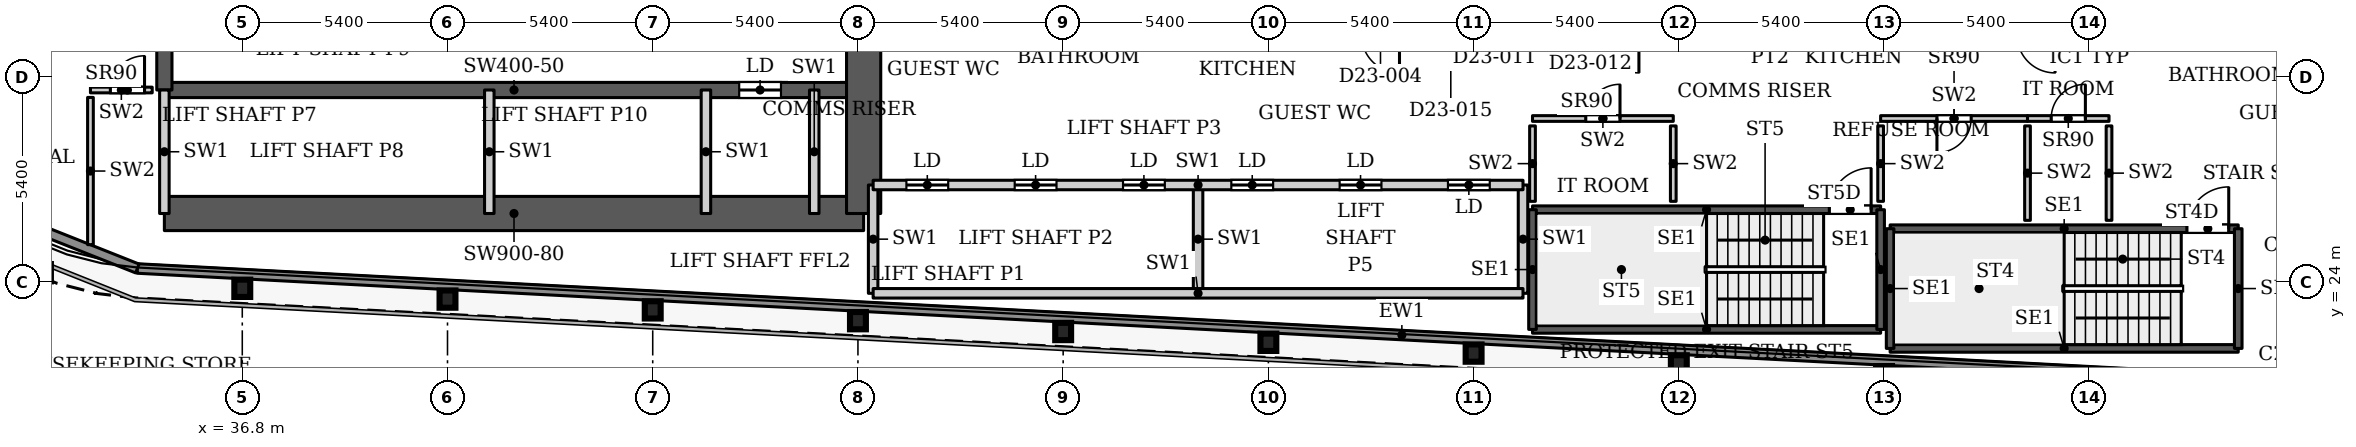
"""IFC4 building model, lengths in metres.
Left out: names, types, materials, properties, quantities, classifications, styles, units other than length and angle.
Written with IfcOpenShell. Run it as: python <this file> out.ifc"""

import sys

from ifc_helpers import new_model, si_unit, direction, frame, frame_2d, origin, origin_2d, place, context, subcontext, project, spatial, rectangle, i_section, extrude, source, transform, mapped, element, fill, save


model = new_model("IFC4")
c1 = context("Model", 3, precision=1e-05, world=origin(), true_north=direction((0.0, 1.0)))
c2 = subcontext(c1, "Body", "Model", "MODEL_VIEW")
j1 = project(units=[si_unit("LENGTHUNIT", "METRE"), si_unit("PLANEANGLEUNIT", "RADIAN")], contexts=[c1])
p1 = place(None, origin())
s1 = spatial("IfcSite", under=j1, at=p1, CompositionType="ELEMENT")
p2 = place(p1, origin())
s2 = spatial("IfcBuilding", under=s1, at=p2, CompositionType="ELEMENT")
p3 = place(p2, frame((0.0, 0.0, 101.9)))
s3 = spatial("IfcBuildingStorey", under=s2, at=p3, CompositionType="ELEMENT", Elevation=101.9)
for number, where, z_axis, x_axis in (
    (1, (80.0, 21.558, 0.0), (0.0, 0.0, 1.0), (1.0, 0.0, 0.0)),
    (2, (74.6, 21.843, 0.0), (0.0, 0.0, 1.0), (1.0, 0.0, 0.0)),
    (3, (69.2, 22.127, 0.0), (0.0, 0.0, 1.0), (1.0, 0.0, 0.0)),
    (4, (63.8, 22.411, 0.0), (0.0, 0.0, 1.0), (1.0, 0.0, 0.0)),
    (5, (58.4, 22.695, 0.0), (0.0, 0.0, 1.0), (1.0, 0.0, 0.0)),
    (6, (53.0, 22.98, 0.0), (0.0, 0.0, 1.0), (1.0, 0.0, 0.0)),
    (7, (47.6, 23.264, 0.0), (0.0, 0.0, 1.0), (1.0, 0.0, 0.0)),
    (8, (42.2, 23.548, 0.0), (0.0, 0.0, 1.0), (1.0, 0.0, 0.0)),
    (9, (36.8, 23.832, 0.0), (0.0, 0.0, 1.0), (1.0, 0.0, 0.0)),
):
    element("IfcColumn", number, at=place(p3, frame(where, z_axis=z_axis, x_axis=x_axis)), inside=s3, PredefinedType="COLUMN", context=c2, shape_type="SweptSolid", body=[
        extrude(i_section(OverallWidth=0.418, OverallDepth=0.455, WebThickness=0.042, FlangeThickness=0.068, FilletRadius=0.014, at=origin_2d()), origin(), (0.0, 0.0, 1.0), 3.9),
    ])
p4 = place(p3, frame((34.75, 25.8, 0.0), z_axis=(0.0, 0.0, 1.0), x_axis=(1.0, 0.0, 0.0)))
e10 = element("IfcWall", 10, at=p4, inside=s3, PredefinedType="SHEAR", context=c2, shape_type="SweptSolid", body=[
    extrude(rectangle(XDim=18.4, YDim=0.9, at=frame_2d((9.2, 0.0))), origin(), (0.0, 0.0, 1.0), 3.9),
])
p5 = place(p3, frame((34.75, 29.05, 0.0), z_axis=(0.0, 0.0, 1.0), x_axis=(1.0, 0.0, 0.0)))
e11 = element("IfcWall", 11, at=p5, inside=s3, PredefinedType="SHEAR", context=c2, shape_type="SweptSolid", body=[
    extrude(rectangle(XDim=18.4, YDim=0.4, at=frame_2d((9.2, 0.0))), origin(), (0.0, 0.0, 1.0), 3.9),
])
p6 = place(p5, frame((15.125, 0.0, 0.0)))
e12 = element("IfcOpeningElement", 12, at=p6, cuts=e11, PredefinedType="OPENING", context=c2, shape_type="SweptSolid", body=[
    extrude(rectangle(XDim=1.1, YDim=2.2, at=frame_2d((0.55, 1.1))), frame((0.0, 0.21, 0.0), z_axis=(0.0, -1.0, 0.0), x_axis=(1.0, 0.0, 0.0)), (0.0, 0.0, 1.0), 0.42),
])
p7 = place(p3, frame((34.75, 29.05, 0.0), z_axis=(0.0, 0.0, 1.0), x_axis=(0.0, 1.0, 0.0)))
e13 = element("IfcWall", 13, at=p7, inside=s3, PredefinedType="SHEAR", context=c2, shape_type="SweptSolid", body=[
    extrude(rectangle(XDim=18.45, YDim=0.4, at=frame_2d((9.225, 0.0))), origin(), (0.0, 0.0, 1.0), 3.9),
])
p8 = place(p7, frame((8.025, 0.0, 0.0)))
e14 = element("IfcOpeningElement", 14, at=p8, cuts=e13, PredefinedType="OPENING", context=c2, shape_type="SweptSolid", body=[
    extrude(rectangle(XDim=1.1, YDim=2.2, at=frame_2d((0.55, 1.1))), frame((0.0, 0.21, 0.0), z_axis=(0.0, -1.0, 0.0), x_axis=(1.0, 0.0, 0.0)), (0.0, 0.0, 1.0), 0.42),
])
p9 = place(p7, frame((10.875, 0.0, 0.0)))
e15 = element("IfcOpeningElement", 15, at=p9, cuts=e13, PredefinedType="OPENING", context=c2, shape_type="SweptSolid", body=[
    extrude(rectangle(XDim=1.1, YDim=2.2, at=frame_2d((0.55, 1.1))), frame((0.0, 0.21, 0.0), z_axis=(0.0, -1.0, 0.0), x_axis=(1.0, 0.0, 0.0)), (0.0, 0.0, 1.0), 0.42),
])
p10 = place(p7, frame((13.725, 0.0, 0.0)))
e16 = element("IfcOpeningElement", 16, at=p10, cuts=e13, PredefinedType="OPENING", context=c2, shape_type="SweptSolid", body=[
    extrude(rectangle(XDim=1.1, YDim=2.2, at=frame_2d((0.55, 1.1))), frame((0.0, 0.21, 0.0), z_axis=(0.0, -1.0, 0.0), x_axis=(1.0, 0.0, 0.0)), (0.0, 0.0, 1.0), 0.42),
])
p11 = place(p7, frame((15.95, 0.0, 0.0)))
e17 = element("IfcOpeningElement", 17, at=p11, cuts=e13, PredefinedType="OPENING", context=c2, shape_type="SweptSolid", body=[
    extrude(rectangle(XDim=1.1, YDim=2.2, at=frame_2d((0.55, 1.1))), frame((0.0, 0.21, 0.0), z_axis=(0.0, -1.0, 0.0), x_axis=(1.0, 0.0, 0.0)), (0.0, 0.0, 1.0), 0.42),
])
p12 = place(p3, frame((53.15, 25.8, 0.0), z_axis=(0.0, 0.0, 1.0), x_axis=(0.0, 1.0, 0.0)))
e18 = element("IfcWall", 18, at=p12, inside=s3, PredefinedType="SHEAR", context=c2, shape_type="SweptSolid", body=[
    extrude(rectangle(XDim=10.4, YDim=0.9, at=frame_2d((5.2, 0.0))), origin(), (0.0, 0.0, 1.0), 3.9),
])
p13 = place(p3, frame((100.586, 20.85, 0.0), z_axis=(0.0, 0.0, 1.0), x_axis=(-0.99861746497, 0.052565755559, 0.0)))
e19 = element("IfcWall", 19, at=p13, inside=s3, PredefinedType="SOLIDWALL", context=c2, shape_type="SweptSolid", body=[
    extrude(rectangle(XDim=66.639, YDim=0.25, at=frame_2d((33.319, 0.0))), origin(), (0.0, 0.0, 1.0), 3.75),
])
p14 = place(p3, frame((34.039, 24.353, 0.0), z_axis=(0.0, 0.0, 1.0), x_axis=(-0.929352825399, 0.369192803184, 0.0)))
e20 = element("IfcWall", 20, at=p14, inside=s3, PredefinedType="SOLIDWALL", context=c2, shape_type="SweptSolid", body=[
    extrude(rectangle(XDim=4.656, YDim=0.25, at=frame_2d((2.328, 0.0))), origin(), (0.0, 0.0, 1.0), 3.75),
])
p15 = place(p3, frame((80.16, 22.25, 0.0), z_axis=(0.0, 0.0, 1.0), x_axis=(1.0, 0.0, 0.0)))
e21 = element("IfcWall", 21, at=p15, inside=s3, PredefinedType="SHEAR", context=c2, shape_type="SweptSolid", body=[
    extrude(rectangle(XDim=9.16, YDim=0.2, at=frame_2d((4.58, 0.0))), origin(), (0.0, 0.0, 1.0), 3.9),
])
p16 = place(p3, frame((80.16, 25.4, 0.0), z_axis=(0.0, 0.0, 1.0), x_axis=(1.0, 0.0, 0.0)))
e22 = element("IfcWall", 22, at=p16, inside=s3, PredefinedType="SHEAR", context=c2, shape_type="SweptSolid", body=[
    extrude(rectangle(XDim=9.16, YDim=0.2, at=frame_2d((4.58, 0.0))), origin(), (0.0, 0.0, 1.0), 3.9),
])
p17 = place(p16, frame((7.81, 0.0, 0.0)))
e23 = element("IfcOpeningElement", 23, at=p17, cuts=e22, PredefinedType="OPENING", context=c2, shape_type="SweptSolid", body=[
    extrude(rectangle(XDim=1.1, YDim=2.2, at=frame_2d((0.55, 1.1))), frame((0.0, 0.11, 0.0), z_axis=(0.0, -1.0, 0.0), x_axis=(1.0, 0.0, 0.0)), (0.0, 0.0, 1.0), 0.22),
])
for number, where, z_axis, x_axis in (
    (24, (80.16, 22.25, 0.0), (0.0, 0.0, 1.0), (0.0, 1.0, 0.0)),
    (25, (89.32, 22.25, 0.0), (0.0, 0.0, 1.0), (0.0, 1.0, 0.0)),
):
    element("IfcWall", number, at=place(p3, frame(where, z_axis=z_axis, x_axis=x_axis)), inside=s3, PredefinedType="SHEAR", context=c2, shape_type="SweptSolid", body=[
        extrude(rectangle(XDim=3.15, YDim=0.2, at=frame_2d((1.575, 0.0))), origin(), (0.0, 0.0, 1.0), 3.9),
    ])
p18 = place(p3, frame((70.75, 22.75, 0.0), z_axis=(0.0, 0.0, 1.0), x_axis=(1.0, 0.0, 0.0)))
e26 = element("IfcWall", 26, at=p18, inside=s3, PredefinedType="SHEAR", context=c2, shape_type="SweptSolid", body=[
    extrude(rectangle(XDim=9.16, YDim=0.2, at=frame_2d((4.58, 0.0))), origin(), (0.0, 0.0, 1.0), 3.9),
])
p19 = place(p3, frame((70.75, 25.9, 0.0), z_axis=(0.0, 0.0, 1.0), x_axis=(1.0, 0.0, 0.0)))
e27 = element("IfcWall", 27, at=p19, inside=s3, PredefinedType="SHEAR", context=c2, shape_type="SweptSolid", body=[
    extrude(rectangle(XDim=9.16, YDim=0.2, at=frame_2d((4.58, 0.0))), origin(), (0.0, 0.0, 1.0), 3.9),
])
p20 = place(p19, frame((7.81, 0.0, 0.0)))
e28 = element("IfcOpeningElement", 28, at=p20, cuts=e27, PredefinedType="OPENING", context=c2, shape_type="SweptSolid", body=[
    extrude(rectangle(XDim=1.1, YDim=2.2, at=frame_2d((0.55, 1.1))), frame((0.0, 0.11, 0.0), z_axis=(0.0, -1.0, 0.0), x_axis=(1.0, 0.0, 0.0)), (0.0, 0.0, 1.0), 0.22),
])
for number, where, z_axis, x_axis in (
    (29, (70.75, 22.75, 0.0), (0.0, 0.0, 1.0), (0.0, 1.0, 0.0)),
    (30, (79.91, 22.75, 0.0), (0.0, 0.0, 1.0), (0.0, 1.0, 0.0)),
):
    element("IfcWall", number, at=place(p3, frame(where, z_axis=z_axis, x_axis=x_axis)), inside=s3, PredefinedType="SHEAR", context=c2, shape_type="SweptSolid", body=[
        extrude(rectangle(XDim=3.15, YDim=0.2, at=frame_2d((1.575, 0.0))), origin(), (0.0, 0.0, 1.0), 3.9),
    ])
for number, where, z_axis, x_axis in (
    (31, (34.75, 25.8, 0.0), (0.0, 0.0, 1.0), (0.0, 1.0, 0.0)),
    (32, (43.3, 25.8, 0.0), (0.0, 0.0, 1.0), (0.0, 1.0, 0.0)),
    (33, (49.0, 25.8, 0.0), (0.0, 0.0, 1.0), (0.0, 1.0, 0.0)),
    (34, (51.85, 25.8, 0.0), (0.0, 0.0, 1.0), (0.0, 1.0, 0.0)),
):
    element("IfcWall", number, at=place(p3, frame(where, z_axis=z_axis, x_axis=x_axis)), inside=s3, PredefinedType="PARTITIONING", context=c2, shape_type="SweptSolid", body=[
        extrude(rectangle(XDim=3.25, YDim=0.25, at=frame_2d((1.625, 0.0))), origin(), (0.0, 0.0, 1.0), 3.9),
    ])
for number, where, z_axis, x_axis in (
    (35, (53.4, 23.7, 0.0), (0.0, 0.0, 1.0), (0.0, 1.0, 0.0)),
    (36, (61.95, 23.7, 0.0), (0.0, 0.0, 1.0), (0.0, 1.0, 0.0)),
    (37, (70.5, 23.7, 0.0), (0.0, 0.0, 1.0), (0.0, 1.0, 0.0)),
):
    element("IfcWall", number, at=place(p3, frame(where, z_axis=z_axis, x_axis=x_axis)), inside=s3, PredefinedType="PARTITIONING", context=c2, shape_type="SweptSolid", body=[
        extrude(rectangle(XDim=2.85, YDim=0.25, at=frame_2d((1.425, 0.0))), origin(), (0.0, 0.0, 1.0), 3.9),
    ])
p21 = place(p3, frame((53.4, 23.7, 0.0), z_axis=(0.0, 0.0, 1.0), x_axis=(1.0, 0.0, 0.0)))
e38 = element("IfcWall", 38, at=p21, inside=s3, PredefinedType="PARTITIONING", context=c2, shape_type="SweptSolid", body=[
    extrude(rectangle(XDim=17.1, YDim=0.25, at=frame_2d((8.55, 0.0))), origin(), (0.0, 0.0, 1.0), 3.9),
])
p22 = place(p3, frame((53.4, 26.55, 0.0), z_axis=(0.0, 0.0, 1.0), x_axis=(1.0, 0.0, 0.0)))
e39 = element("IfcWall", 39, at=p22, inside=s3, PredefinedType="PARTITIONING", context=c2, shape_type="SweptSolid", body=[
    extrude(rectangle(XDim=17.1, YDim=0.25, at=frame_2d((8.55, 0.0))), origin(), (0.0, 0.0, 1.0), 3.9),
])
p23 = place(p22, frame((0.875, 0.0, 0.0)))
e40 = element("IfcOpeningElement", 40, at=p23, cuts=e39, PredefinedType="OPENING", context=c2, shape_type="SweptSolid", body=[
    extrude(rectangle(XDim=1.1, YDim=2.2, at=frame_2d((0.55, 1.1))), frame((0.0, 0.135, 0.0), z_axis=(0.0, -1.0, 0.0), x_axis=(1.0, 0.0, 0.0)), (0.0, 0.0, 1.0), 0.27),
])
p24 = place(p22, frame((3.725, 0.0, 0.0)))
e41 = element("IfcOpeningElement", 41, at=p24, cuts=e39, PredefinedType="OPENING", context=c2, shape_type="SweptSolid", body=[
    extrude(rectangle(XDim=1.1, YDim=2.2, at=frame_2d((0.55, 1.1))), frame((0.0, 0.135, 0.0), z_axis=(0.0, -1.0, 0.0), x_axis=(1.0, 0.0, 0.0)), (0.0, 0.0, 1.0), 0.27),
])
p25 = place(p22, frame((6.575, 0.0, 0.0)))
e42 = element("IfcOpeningElement", 42, at=p25, cuts=e39, PredefinedType="OPENING", context=c2, shape_type="SweptSolid", body=[
    extrude(rectangle(XDim=1.1, YDim=2.2, at=frame_2d((0.55, 1.1))), frame((0.0, 0.135, 0.0), z_axis=(0.0, -1.0, 0.0), x_axis=(1.0, 0.0, 0.0)), (0.0, 0.0, 1.0), 0.27),
])
p26 = place(p22, frame((9.425, 0.0, 0.0)))
e43 = element("IfcOpeningElement", 43, at=p26, cuts=e39, PredefinedType="OPENING", context=c2, shape_type="SweptSolid", body=[
    extrude(rectangle(XDim=1.1, YDim=2.2, at=frame_2d((0.55, 1.1))), frame((0.0, 0.135, 0.0), z_axis=(0.0, -1.0, 0.0), x_axis=(1.0, 0.0, 0.0)), (0.0, 0.0, 1.0), 0.27),
])
p27 = place(p22, frame((12.275, 0.0, 0.0)))
e44 = element("IfcOpeningElement", 44, at=p27, cuts=e39, PredefinedType="OPENING", context=c2, shape_type="SweptSolid", body=[
    extrude(rectangle(XDim=1.1, YDim=2.2, at=frame_2d((0.55, 1.1))), frame((0.0, 0.135, 0.0), z_axis=(0.0, -1.0, 0.0), x_axis=(1.0, 0.0, 0.0)), (0.0, 0.0, 1.0), 0.27),
])
p28 = place(p22, frame((15.125, 0.0, 0.0)))
e45 = element("IfcOpeningElement", 45, at=p28, cuts=e39, PredefinedType="OPENING", context=c2, shape_type="SweptSolid", body=[
    extrude(rectangle(XDim=1.1, YDim=2.2, at=frame_2d((0.55, 1.1))), frame((0.0, 0.135, 0.0), z_axis=(0.0, -1.0, 0.0), x_axis=(1.0, 0.0, 0.0)), (0.0, 0.0, 1.0), 0.27),
])
p29 = place(p3, frame((32.805, 29.05, 0.0), z_axis=(0.0, 0.0, 1.0), x_axis=(1.0, 0.0, 0.0)))
e46 = element("IfcWall", 46, at=p29, inside=s3, PredefinedType="PARTITIONING", context=c2, shape_type="SweptSolid", body=[
    extrude(rectangle(XDim=1.625, YDim=0.15, at=frame_2d((0.812, 0.0))), origin(), (0.0, 0.0, 1.0), 3.9),
])
p30 = place(p29, frame((0.523, 0.0, 0.0)))
e47 = element("IfcOpeningElement", 47, at=p30, cuts=e46, PredefinedType="OPENING", context=c2, shape_type="SweptSolid", body=[
    extrude(rectangle(XDim=0.9, YDim=2.2, at=frame_2d((0.45, 1.1))), frame((0.0, 0.085, 0.0), z_axis=(0.0, -1.0, 0.0), x_axis=(1.0, 0.0, 0.0)), (0.0, 0.0, 1.0), 0.17),
])
p31 = place(p3, frame((32.805, 24.98, 0.0), z_axis=(0.0, 0.0, 1.0), x_axis=(0.0, 1.0, 0.0)))
e48 = element("IfcWall", 48, at=p31, inside=s3, PredefinedType="PARTITIONING", context=c2, shape_type="SweptSolid", body=[
    extrude(rectangle(XDim=3.875, YDim=0.15, at=frame_2d((1.938, 0.0))), origin(), (0.0, 0.0, 1.0), 3.9),
])
p32 = place(p3, frame((70.75, 28.3, 0.0), z_axis=(0.0, 0.0, 1.0), x_axis=(1.0, 0.0, 0.0)))
e49 = element("IfcWall", 49, at=p32, inside=s3, PredefinedType="PARTITIONING", context=c2, shape_type="SweptSolid", body=[
    extrude(rectangle(XDim=3.704, YDim=0.15, at=frame_2d((1.852, 0.0))), origin(), (0.0, 0.0, 1.0), 3.9),
])
p33 = place(p32, frame((1.402, 0.0, 0.0)))
e50 = element("IfcOpeningElement", 50, at=p33, cuts=e49, PredefinedType="OPENING", context=c2, shape_type="SweptSolid", body=[
    extrude(rectangle(XDim=0.9, YDim=2.2, at=frame_2d((0.45, 1.1))), frame((0.0, 0.085, 0.0), z_axis=(0.0, -1.0, 0.0), x_axis=(1.0, 0.0, 0.0)), (0.0, 0.0, 1.0), 0.17),
])
for number, where, z_axis, x_axis in (
    (51, (70.75, 26.12, 0.0), (0.0, 0.0, 1.0), (0.0, 1.0, 0.0)),
    (52, (74.454, 26.12, 0.0), (0.0, 0.0, 1.0), (0.0, 1.0, 0.0)),
):
    element("IfcWall", number, at=place(p3, frame(where, z_axis=z_axis, x_axis=x_axis)), inside=s3, PredefinedType="PARTITIONING", context=c2, shape_type="SweptSolid", body=[
        extrude(rectangle(XDim=1.985, YDim=0.15, at=frame_2d((0.992, 0.0))), origin(), (0.0, 0.0, 1.0), 3.9),
    ])
p34 = place(p3, frame((79.91, 28.3, 0.0), z_axis=(0.0, 0.0, 1.0), x_axis=(1.0, 0.0, 0.0)))
e53 = element("IfcWall", 53, at=p34, inside=s3, PredefinedType="PARTITIONING", context=c2, shape_type="SweptSolid", body=[
    extrude(rectangle(XDim=3.865, YDim=0.15, at=frame_2d((1.933, 0.0))), origin(), (0.0, 0.0, 1.0), 3.9),
])
p35 = place(p34, frame((1.482, 0.0, 0.0)))
e54 = element("IfcOpeningElement", 54, at=p35, cuts=e53, PredefinedType="OPENING", context=c2, shape_type="SweptSolid", body=[
    extrude(rectangle(XDim=0.9, YDim=2.2, at=frame_2d((0.45, 1.1))), frame((0.0, 0.085, 0.0), z_axis=(0.0, -1.0, 0.0), x_axis=(1.0, 0.0, 0.0)), (0.0, 0.0, 1.0), 0.17),
])
p36 = place(p3, frame((79.91, 26.12, 0.0), z_axis=(0.0, 0.0, 1.0), x_axis=(0.0, 1.0, 0.0)))
e55 = element("IfcWall", 55, at=p36, inside=s3, PredefinedType="PARTITIONING", context=c2, shape_type="SweptSolid", body=[
    extrude(rectangle(XDim=1.985, YDim=0.15, at=frame_2d((0.992, 0.0))), origin(), (0.0, 0.0, 1.0), 3.9),
])
p37 = place(p3, frame((83.775, 25.62, 0.0), z_axis=(0.0, 0.0, 1.0), x_axis=(0.0, 1.0, 0.0)))
e56 = element("IfcWall", 56, at=p37, inside=s3, PredefinedType="PARTITIONING", context=c2, shape_type="SweptSolid", body=[
    extrude(rectangle(XDim=2.485, YDim=0.15, at=frame_2d((1.242, 0.0))), origin(), (0.0, 0.0, 1.0), 3.9),
])
p38 = place(p3, frame((83.775, 28.3, 0.0), z_axis=(0.0, 0.0, 1.0), x_axis=(1.0, 0.0, 0.0)))
e57 = element("IfcWall", 57, at=p38, inside=s3, PredefinedType="PARTITIONING", context=c2, shape_type="SweptSolid", body=[
    extrude(rectangle(XDim=2.145, YDim=0.15, at=frame_2d((1.073, 0.0))), origin(), (0.0, 0.0, 1.0), 3.9),
])
p39 = place(p38, frame((0.623, 0.0, 0.0)))
e58 = element("IfcOpeningElement", 58, at=p39, cuts=e57, PredefinedType="OPENING", context=c2, shape_type="SweptSolid", body=[
    extrude(rectangle(XDim=0.9, YDim=2.2, at=frame_2d((0.45, 1.1))), frame((0.0, 0.085, 0.0), z_axis=(0.0, -1.0, 0.0), x_axis=(1.0, 0.0, 0.0)), (0.0, 0.0, 1.0), 0.17),
])
p40 = place(p3, frame((85.92, 25.62, 0.0), z_axis=(0.0, 0.0, 1.0), x_axis=(0.0, 1.0, 0.0)))
e59 = element("IfcWall", 59, at=p40, inside=s3, PredefinedType="PARTITIONING", context=c2, shape_type="SweptSolid", body=[
    extrude(rectangle(XDim=2.485, YDim=0.15, at=frame_2d((1.242, 0.0))), origin(), (0.0, 0.0, 1.0), 3.9),
])
m1 = source(origin(), c2, "Body", "SweptSolid", [
    extrude(rectangle(XDim=1.1, YDim=2.2, at=frame_2d((0.55, 1.1))), frame((0.0, 0.025, 0.0), z_axis=(0.0, -1.0, 0.0), x_axis=(1.0, 0.0, 0.0)), (0.0, 0.0, 1.0), 0.05),
])
p41 = place(p23, origin())
e60 = element("IfcDoor", 60, at=p41, inside=s3, OperationType="SLIDING_TO_LEFT", PredefinedType="DOOR", context=c2, shape_type="MappedRepresentation", body=[
    mapped(m1, transform((0.0, 0.0, 0.0), x_axis=(1.0, 0.0, 0.0), y_axis=(0.0, 1.0, 0.0), z_axis=(0.0, 0.0, 1.0), scale=1.0)),
])
fill(e40, e60)
p42 = place(p24, origin())
e61 = element("IfcDoor", 61, at=p42, inside=s3, OperationType="SLIDING_TO_LEFT", PredefinedType="DOOR", context=c2, shape_type="MappedRepresentation", body=[
    mapped(m1, transform((0.0, 0.0, 0.0), x_axis=(1.0, 0.0, 0.0), y_axis=(0.0, 1.0, 0.0), z_axis=(0.0, 0.0, 1.0), scale=1.0)),
])
fill(e41, e61)
p43 = place(p25, origin())
e62 = element("IfcDoor", 62, at=p43, inside=s3, OperationType="SLIDING_TO_LEFT", PredefinedType="DOOR", context=c2, shape_type="MappedRepresentation", body=[
    mapped(m1, transform((0.0, 0.0, 0.0), x_axis=(1.0, 0.0, 0.0), y_axis=(0.0, 1.0, 0.0), z_axis=(0.0, 0.0, 1.0), scale=1.0)),
])
fill(e42, e62)
p44 = place(p26, origin())
e63 = element("IfcDoor", 63, at=p44, inside=s3, OperationType="SLIDING_TO_LEFT", PredefinedType="DOOR", context=c2, shape_type="MappedRepresentation", body=[
    mapped(m1, transform((0.0, 0.0, 0.0), x_axis=(1.0, 0.0, 0.0), y_axis=(0.0, 1.0, 0.0), z_axis=(0.0, 0.0, 1.0), scale=1.0)),
])
fill(e43, e63)
p45 = place(p27, origin())
e64 = element("IfcDoor", 64, at=p45, inside=s3, OperationType="SLIDING_TO_LEFT", PredefinedType="DOOR", context=c2, shape_type="MappedRepresentation", body=[
    mapped(m1, transform((0.0, 0.0, 0.0), x_axis=(1.0, 0.0, 0.0), y_axis=(0.0, 1.0, 0.0), z_axis=(0.0, 0.0, 1.0), scale=1.0)),
])
fill(e44, e64)
p46 = place(p28, origin())
e65 = element("IfcDoor", 65, at=p46, inside=s3, OperationType="SLIDING_TO_LEFT", PredefinedType="DOOR", context=c2, shape_type="MappedRepresentation", body=[
    mapped(m1, transform((0.0, 0.0, 0.0), x_axis=(1.0, 0.0, 0.0), y_axis=(0.0, 1.0, 0.0), z_axis=(0.0, 0.0, 1.0), scale=1.0)),
])
fill(e45, e65)
p47 = place(p6, origin())
e66 = element("IfcDoor", 66, at=p47, inside=s3, OperationType="SLIDING_TO_LEFT", PredefinedType="DOOR", context=c2, shape_type="MappedRepresentation", body=[
    mapped(m1, transform((0.0, 0.0, 0.0), x_axis=(1.0, 0.0, 0.0), y_axis=(0.0, 1.0, 0.0), z_axis=(0.0, 0.0, 1.0), scale=1.0)),
])
fill(e12, e66)
m2 = source(origin(), c2, "Body", "SweptSolid", [
    extrude(rectangle(XDim=0.9, YDim=2.2, at=frame_2d((0.45, 1.1))), frame((0.0, 0.025, 0.0), z_axis=(0.0, -1.0, 0.0), x_axis=(1.0, 0.0, 0.0)), (0.0, 0.0, 1.0), 0.05),
])
p48 = place(p30, origin())
e67 = element("IfcDoor", 67, at=p48, inside=s3, OperationType="SINGLE_SWING_LEFT", PredefinedType="DOOR", context=c2, shape_type="MappedRepresentation", body=[
    mapped(m2, transform((0.0, 0.0, 0.0), x_axis=(1.0, 0.0, 0.0), y_axis=(0.0, 1.0, 0.0), z_axis=(0.0, 0.0, 1.0), scale=1.0)),
])
fill(e47, e67)
p49 = place(p33, origin())
e68 = element("IfcDoor", 68, at=p49, inside=s3, OperationType="SINGLE_SWING_LEFT", PredefinedType="DOOR", context=c2, shape_type="MappedRepresentation", body=[
    mapped(m2, transform((0.0, 0.0, 0.0), x_axis=(1.0, 0.0, 0.0), y_axis=(0.0, 1.0, 0.0), z_axis=(0.0, 0.0, 1.0), scale=1.0)),
])
fill(e50, e68)
p50 = place(p35, origin())
e69 = element("IfcDoor", 69, at=p50, inside=s3, OperationType="SINGLE_SWING_RIGHT", PredefinedType="DOOR", context=c2, shape_type="MappedRepresentation", body=[
    mapped(m2, transform((0.0, 0.0, 0.0), x_axis=(1.0, 0.0, 0.0), y_axis=(0.0, 1.0, 0.0), z_axis=(0.0, 0.0, 1.0), scale=1.0)),
])
fill(e54, e69)
p51 = place(p39, origin())
e70 = element("IfcDoor", 70, at=p51, inside=s3, OperationType="SINGLE_SWING_LEFT", PredefinedType="DOOR", context=c2, shape_type="MappedRepresentation", body=[
    mapped(m2, transform((0.0, 0.0, 0.0), x_axis=(1.0, 0.0, 0.0), y_axis=(0.0, 1.0, 0.0), z_axis=(0.0, 0.0, 1.0), scale=1.0)),
])
fill(e58, e70)
m3 = source(origin(), c2, "Body", "SweptSolid", [
    extrude(rectangle(XDim=1.1, YDim=2.2, at=frame_2d((0.55, 1.1))), frame((0.0, 0.025, 0.0), z_axis=(0.0, -1.0, 0.0), x_axis=(1.0, 0.0, 0.0)), (0.0, 0.0, 1.0), 0.05),
])
p52 = place(p17, origin())
e71 = element("IfcDoor", 71, at=p52, inside=s3, OperationType="SINGLE_SWING_LEFT", PredefinedType="DOOR", context=c2, shape_type="MappedRepresentation", body=[
    mapped(m3, transform((0.0, 0.0, 0.0), x_axis=(1.0, 0.0, 0.0), y_axis=(0.0, 1.0, 0.0), z_axis=(0.0, 0.0, 1.0), scale=1.0)),
])
fill(e23, e71)
p53 = place(p20, origin())
e72 = element("IfcDoor", 72, at=p53, inside=s3, OperationType="SINGLE_SWING_LEFT", PredefinedType="DOOR", context=c2, shape_type="MappedRepresentation", body=[
    mapped(m3, transform((0.0, 0.0, 0.0), x_axis=(1.0, 0.0, 0.0), y_axis=(0.0, 1.0, 0.0), z_axis=(0.0, 0.0, 1.0), scale=1.0)),
])
fill(e28, e72)
save(model, sys.argv[1])
